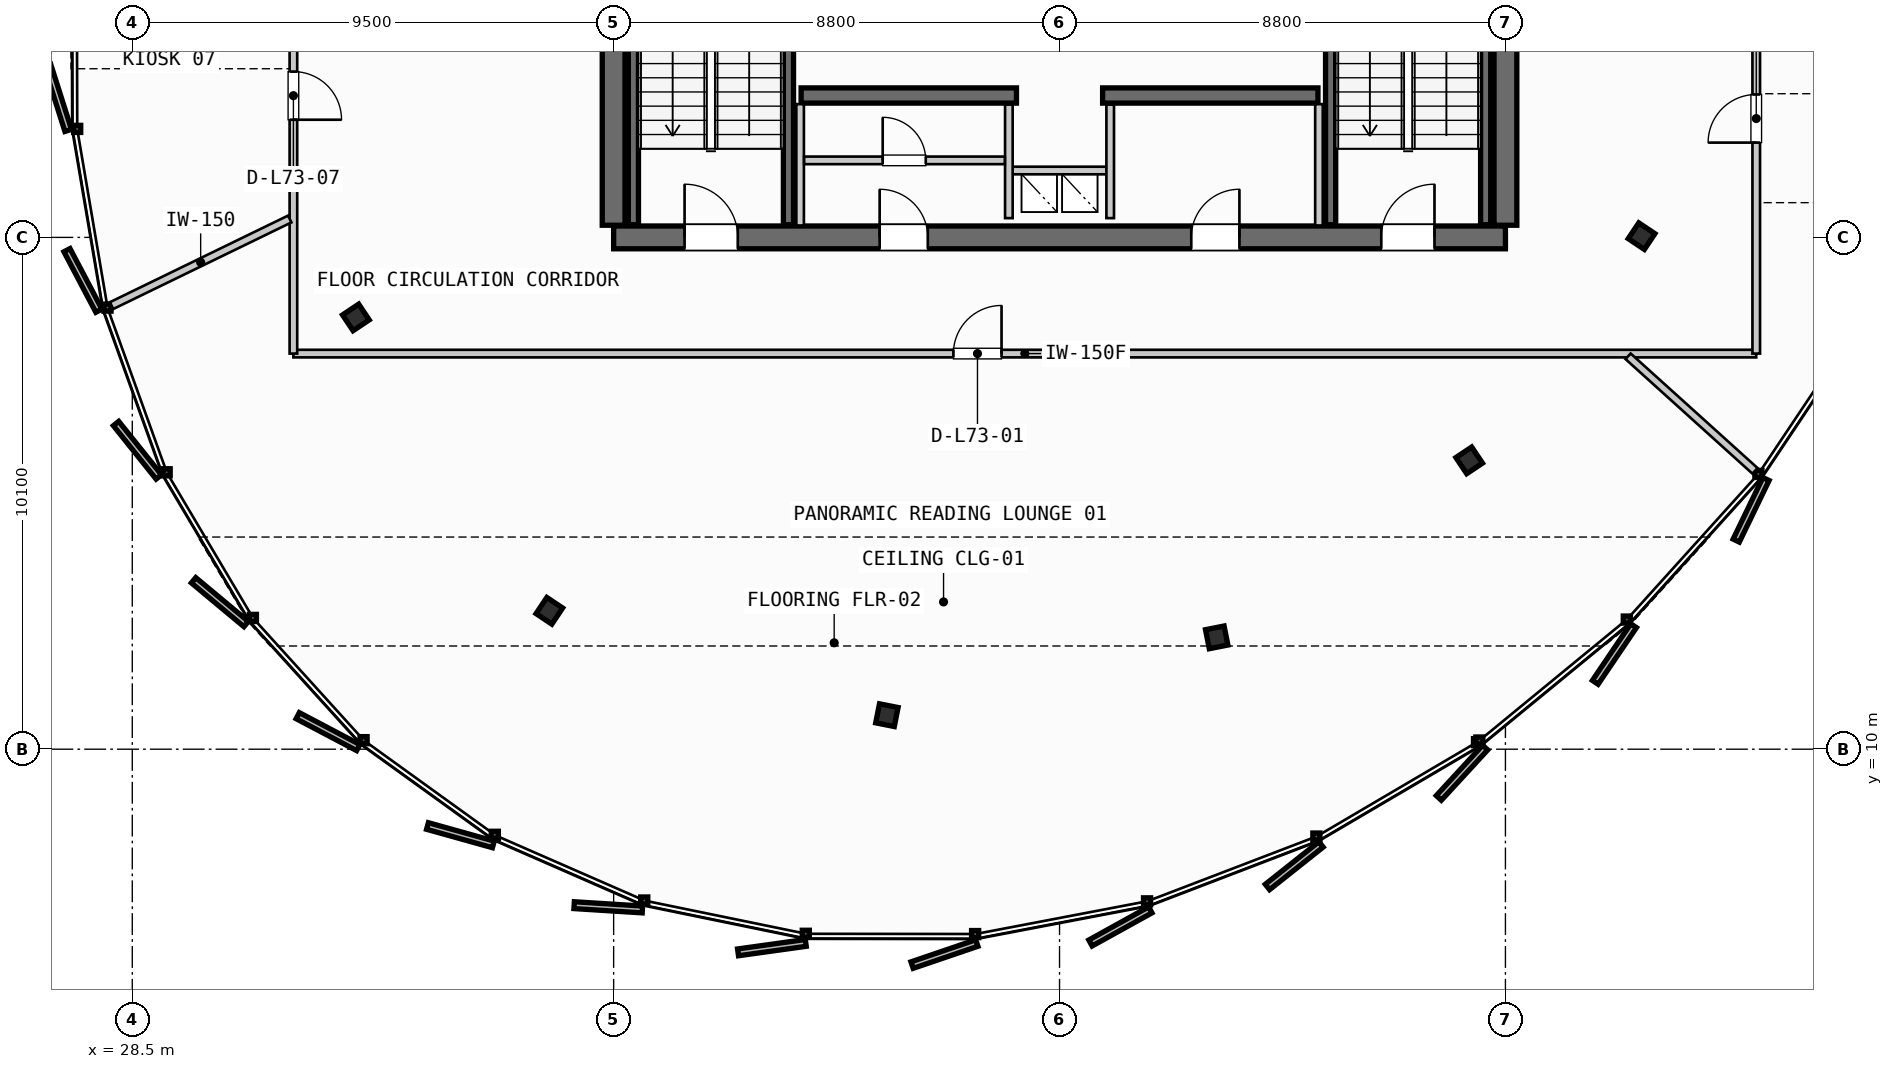
"""IFC4 building model, lengths in metres.
Left out: names, types, materials, properties, quantities, classifications, styles, units other than length and angle.
Written with IfcOpenShell. Run it as: python <this file> out.ifc"""

import sys

from ifc_helpers import new_model, si_unit, direction, frame, frame_2d, origin, origin_2d, place, context, subcontext, project, spatial, rectangle, i_section, extrude, source, transform, mapped, element, fill, save


model = new_model("IFC4")
c1 = context("Model", 3, precision=1e-05, world=origin(), true_north=direction((0.0, 1.0)))
c2 = subcontext(c1, "Body", "Model", "MODEL_VIEW")
j1 = project(units=[si_unit("LENGTHUNIT", "METRE"), si_unit("PLANEANGLEUNIT", "RADIAN")], contexts=[c1])
p1 = place(None, origin())
s1 = spatial("IfcSite", under=j1, at=p1, CompositionType="ELEMENT")
p2 = place(p1, origin())
s2 = spatial("IfcBuilding", under=s1, at=p2, CompositionType="ELEMENT")
p3 = place(p2, frame((0.0, 0.0, 276.7)))
s3 = spatial("IfcBuildingStorey", under=s2, at=p3, CompositionType="ELEMENT", Elevation=276.7)
p4 = place(p3, frame((38.0, 20.1, 0.0), z_axis=(0.0, 0.0, 1.0), x_axis=(1.0, 0.0, 0.0)))
e1 = element("IfcWall", 1, at=p4, inside=s3, PredefinedType="SHEAR", context=c2, shape_type="SweptSolid", body=[
    extrude(rectangle(XDim=17.6, YDim=0.45, at=frame_2d((8.8, 0.0))), origin(), (0.0, 0.0, 1.0), 3.21),
])
p5 = place(p4, frame((1.4, 0.0, 0.0)))
e2 = element("IfcOpeningElement", 2, at=p5, cuts=e1, PredefinedType="OPENING", context=c2, shape_type="SweptSolid", body=[
    extrude(rectangle(XDim=1.05, YDim=2.15, at=frame_2d((0.525, 1.075))), frame((0.0, 0.235, 0.0), z_axis=(0.0, -1.0, 0.0), x_axis=(1.0, 0.0, 0.0)), (0.0, 0.0, 1.0), 0.47),
])
p6 = place(p4, frame((15.15, 0.0, 0.0)))
e3 = element("IfcOpeningElement", 3, at=p6, cuts=e1, PredefinedType="OPENING", context=c2, shape_type="SweptSolid", body=[
    extrude(rectangle(XDim=1.05, YDim=2.15, at=frame_2d((0.525, 1.075))), frame((0.0, 0.235, 0.0), z_axis=(0.0, -1.0, 0.0), x_axis=(1.0, 0.0, 0.0)), (0.0, 0.0, 1.0), 0.47),
])
p7 = place(p4, frame((5.25, 0.0, 0.0)))
e4 = element("IfcOpeningElement", 4, at=p7, cuts=e1, PredefinedType="OPENING", context=c2, shape_type="SweptSolid", body=[
    extrude(rectangle(XDim=0.95, YDim=2.15, at=frame_2d((0.475, 1.075))), frame((0.0, 0.235, 0.0), z_axis=(0.0, -1.0, 0.0), x_axis=(1.0, 0.0, 0.0)), (0.0, 0.0, 1.0), 0.47),
])
p8 = place(p4, frame((11.4, 0.0, 0.0)))
e5 = element("IfcOpeningElement", 5, at=p8, cuts=e1, PredefinedType="OPENING", context=c2, shape_type="SweptSolid", body=[
    extrude(rectangle(XDim=0.95, YDim=2.15, at=frame_2d((0.475, 1.075))), frame((0.0, 0.235, 0.0), z_axis=(0.0, -1.0, 0.0), x_axis=(1.0, 0.0, 0.0)), (0.0, 0.0, 1.0), 0.47),
])
p9 = place(p3, frame((38.0, 35.26, 0.0), z_axis=(0.0, 0.0, 1.0), x_axis=(0.0, -1.0, 0.0)))
e6 = element("IfcWall", 6, at=p9, inside=s3, PredefinedType="SHEAR", context=c2, shape_type="SweptSolid", body=[
    extrude(rectangle(XDim=14.92, YDim=0.45, at=frame_2d((7.46, 0.0))), origin(), (0.0, 0.0, 1.0), 3.21),
])
p10 = place(p9, frame((5.21, 0.0, 0.0)))
e7 = element("IfcOpeningElement", 7, at=p10, cuts=e6, PredefinedType="OPENING", context=c2, shape_type="SweptSolid", body=[
    extrude(rectangle(XDim=1.1, YDim=2.2, at=frame_2d((0.55, 1.1))), frame((0.0, 0.235, 0.0), z_axis=(0.0, -1.0, 0.0), x_axis=(1.0, 0.0, 0.0)), (0.0, 0.0, 1.0), 0.47),
])
p11 = place(p3, frame((55.6, 20.34, 0.0), z_axis=(0.0, 0.0, 1.0), x_axis=(0.0, 1.0, 0.0)))
e8 = element("IfcWall", 8, at=p11, inside=s3, PredefinedType="SHEAR", context=c2, shape_type="SweptSolid", body=[
    extrude(rectangle(XDim=14.92, YDim=0.45, at=frame_2d((7.46, 0.0))), origin(), (0.0, 0.0, 1.0), 3.21),
])
p12 = place(p11, frame((12.71, 0.0, 0.0)))
e9 = element("IfcOpeningElement", 9, at=p12, cuts=e8, PredefinedType="OPENING", context=c2, shape_type="SweptSolid", body=[
    extrude(rectangle(XDim=1.05, YDim=2.15, at=frame_2d((0.525, 1.075))), frame((0.0, 0.235, 0.0), z_axis=(0.0, -1.0, 0.0), x_axis=(1.0, 0.0, 0.0)), (0.0, 0.0, 1.0), 0.47),
])
p13 = place(p11, frame((8.61, 0.0, 0.0)))
e10 = element("IfcOpeningElement", 10, at=p13, cuts=e8, PredefinedType="OPENING", context=c2, shape_type="SweptSolid", body=[
    extrude(rectangle(XDim=1.1, YDim=2.2, at=frame_2d((0.55, 1.1))), frame((0.0, 0.235, 0.0), z_axis=(0.0, -1.0, 0.0), x_axis=(1.0, 0.0, 0.0)), (0.0, 0.0, 1.0), 0.47),
])
for number, where, z_axis, x_axis in (
    (11, (41.7, 22.9, 0.0), (0.0, 0.0, 1.0), (1.0, 0.0, 0.0)),
    (12, (47.65, 22.9, 0.0), (0.0, 0.0, 1.0), (1.0, 0.0, 0.0)),
):
    element("IfcWall", number, at=place(p3, frame(where, z_axis=z_axis, x_axis=x_axis)), inside=s3, PredefinedType="SHEAR", context=c2, shape_type="SweptSolid", body=[
        extrude(rectangle(XDim=4.25, YDim=0.3, at=frame_2d((2.125, 0.0))), origin(), (0.0, 0.0, 1.0), 3.21),
    ])
m1 = source(origin(), c2, "Body", "SweptSolid", [
    extrude(i_section(OverallWidth=0.374, OverallDepth=0.383, WebThickness=0.017, FlangeThickness=0.026, FilletRadius=0.015, at=origin_2d()), origin(), (0.0, 0.0, 1.0), 3.21),
])
for number, where, z_axis, x_axis in (
    (13, (32.913, 18.521, 0.0), (0.0, 0.0, 1.0), (-0.831, -0.556, 0.0)),
    (14, (36.731, 12.731, 0.0), (0.0, 0.0, 1.0), (-0.556, -0.831, 0.0)),
    (15, (43.393, 10.671, 0.0), (0.0, 0.0, 1.0), (-0.195, -0.981, 0.0)),
    (16, (49.902, 12.207, 0.0), (0.0, 0.0, 1.0), (0.195, -0.981, 0.0)),
    (17, (54.885, 15.7, 0.0), (0.0, 0.0, 1.0), (0.556, -0.831, 0.0)),
    (18, (58.287, 20.125, 0.0), (0.0, 0.0, 1.0), (0.831, -0.556, 0.0)),
):
    element("IfcColumn", number, at=place(p3, frame(where, z_axis=z_axis, x_axis=x_axis)), inside=s3, PredefinedType="COLUMN", context=c2, shape_type="MappedRepresentation", body=[
        mapped(m1, transform((0.0, 0.0, 0.0), scale=1.0)),
    ])
for number, where, z_axis, x_axis in (
    (19, (41.45, 27.7, 0.0), (0.0, 0.0, 1.0), (0.0, -1.0, 0.0)),
    (20, (38.39, 20.35, 0.0), (0.0, 0.0, 1.0), (0.0, 1.0, 0.0)),
    (21, (55.21, 27.7, 0.0), (0.0, 0.0, 1.0), (0.0, -1.0, 0.0)),
    (22, (52.15, 20.35, 0.0), (0.0, 0.0, 1.0), (0.0, 1.0, 0.0)),
):
    element("IfcWall", number, at=place(p3, frame(where, z_axis=z_axis, x_axis=x_axis)), inside=s3, PredefinedType="SHEAR", context=c2, shape_type="SweptSolid", body=[
        extrude(rectangle(XDim=7.35, YDim=0.2, at=frame_2d((3.675, 0.0))), origin(), (0.0, 0.0, 1.0), 3.21),
    ])
p14 = place(p3, frame((45.8, 21.42, 0.0), z_axis=(0.0, 0.0, 1.0), x_axis=(1.0, 0.0, 0.0)))
e23 = element("IfcWall", 23, at=p14, inside=s3, PredefinedType="PARTITIONING", context=c2, shape_type="SweptSolid", body=[
    extrude(rectangle(XDim=2.0, YDim=0.15, at=frame_2d((1.0, 0.0))), origin(), (0.0, 0.0, 1.0), 2.455),
])
for number, where, z_axis, x_axis in (
    (24, (45.8, 20.48, 0.0), (0.0, 0.0, 1.0), (0.0, 1.0, 0.0)),
    (25, (47.8, 20.48, 0.0), (0.0, 0.0, 1.0), (0.0, 1.0, 0.0)),
):
    element("IfcWall", number, at=place(p3, frame(where, z_axis=z_axis, x_axis=x_axis)), inside=s3, PredefinedType="PARTITIONING", context=c2, shape_type="SweptSolid", body=[
        extrude(rectangle(XDim=2.24, YDim=0.15, at=frame_2d((1.12, 0.0))), origin(), (0.0, 0.0, 1.0), 2.455),
    ])
for number, where, z_axis, x_axis in (
    (26, (41.68, 20.335, 0.0), (0.0, 0.0, 1.0), (0.0, 1.0, 0.0)),
    (27, (51.92, 20.335, 0.0), (0.0, 0.0, 1.0), (0.0, 1.0, 0.0)),
):
    element("IfcWall", number, at=place(p3, frame(where, z_axis=z_axis, x_axis=x_axis)), inside=s3, PredefinedType="PARTITIONING", context=c2, shape_type="SweptSolid", body=[
        extrude(rectangle(XDim=2.395, YDim=0.15, at=frame_2d((1.198, 0.0))), origin(), (0.0, 0.0, 1.0), 2.455),
    ])
p15 = place(p3, frame((41.76, 21.62, 0.0), z_axis=(0.0, 0.0, 1.0), x_axis=(1.0, 0.0, 0.0)))
e28 = element("IfcWall", 28, at=p15, inside=s3, PredefinedType="PARTITIONING", context=c2, shape_type="SweptSolid", body=[
    extrude(rectangle(XDim=3.96, YDim=0.15, at=frame_2d((1.98, 0.0))), origin(), (0.0, 0.0, 1.0), 2.455),
])
p16 = place(p15, frame((1.55, 0.0, 0.0)))
e29 = element("IfcOpeningElement", 29, at=p16, cuts=e28, PredefinedType="OPENING", context=c2, shape_type="SweptSolid", body=[
    extrude(rectangle(XDim=0.85, YDim=2.15, at=frame_2d((0.425, 1.075))), frame((0.0, 0.085, 0.0), z_axis=(0.0, -1.0, 0.0), x_axis=(1.0, 0.0, 0.0)), (0.0, 0.0, 1.0), 0.17),
])
p17 = place(p3, frame((31.68, 17.807, 0.0), z_axis=(0.0, 0.0, 1.0), x_axis=(1.0, 0.0, 0.0)))
e30 = element("IfcWall", 30, at=p17, inside=s3, PredefinedType="PARTITIONING", context=c2, shape_type="SweptSolid", body=[
    extrude(rectangle(XDim=28.87, YDim=0.15, at=frame_2d((14.435, 0.0))), origin(), (0.0, 0.0, 1.0), 2.455),
])
p18 = place(p17, frame((13.025, 0.0, 0.0)))
e31 = element("IfcOpeningElement", 31, at=p18, cuts=e30, PredefinedType="OPENING", context=c2, shape_type="SweptSolid", body=[
    extrude(rectangle(XDim=0.95, YDim=2.15, at=frame_2d((0.475, 1.075))), frame((0.0, 0.085, 0.0), z_axis=(0.0, -1.0, 0.0), x_axis=(1.0, 0.0, 0.0)), (0.0, 0.0, 1.0), 0.17),
])
p19 = place(p3, frame((60.55, 17.807, 0.0), z_axis=(0.0, 0.0, 1.0), x_axis=(0.0, 1.0, 0.0)))
e32 = element("IfcWall", 32, at=p19, inside=s3, PredefinedType="PARTITIONING", context=c2, shape_type="SweptSolid", body=[
    extrude(rectangle(XDim=19.986, YDim=0.15, at=frame_2d((9.993, 0.0))), origin(), (0.0, 0.0, 1.0), 2.455),
])
p20 = place(p19, frame((4.164, 0.0, 0.0)))
e33 = element("IfcOpeningElement", 33, at=p20, cuts=e32, PredefinedType="OPENING", context=c2, shape_type="SweptSolid", body=[
    extrude(rectangle(XDim=0.95, YDim=2.15, at=frame_2d((0.475, 1.075))), frame((0.0, 0.085, 0.0), z_axis=(0.0, -1.0, 0.0), x_axis=(1.0, 0.0, 0.0)), (0.0, 0.0, 1.0), 0.17),
])
p21 = place(p19, frame((14.036, 0.0, 0.0)))
e34 = element("IfcOpeningElement", 34, at=p21, cuts=e32, PredefinedType="OPENING", context=c2, shape_type="SweptSolid", body=[
    extrude(rectangle(XDim=0.95, YDim=2.15, at=frame_2d((0.475, 1.075))), frame((0.0, 0.085, 0.0), z_axis=(0.0, -1.0, 0.0), x_axis=(1.0, 0.0, 0.0)), (0.0, 0.0, 1.0), 0.17),
])
p22 = place(p3, frame((31.68, 37.793, 0.0), z_axis=(0.0, 0.0, 1.0), x_axis=(0.0, -1.0, 0.0)))
e35 = element("IfcWall", 35, at=p22, inside=s3, PredefinedType="PARTITIONING", context=c2, shape_type="SweptSolid", body=[
    extrude(rectangle(XDim=19.986, YDim=0.15, at=frame_2d((9.993, 0.0))), origin(), (0.0, 0.0, 1.0), 2.455),
])
p23 = place(p22, frame((4.422, 0.0, 0.0)))
e36 = element("IfcOpeningElement", 36, at=p23, cuts=e35, PredefinedType="OPENING", context=c2, shape_type="SweptSolid", body=[
    extrude(rectangle(XDim=0.95, YDim=2.15, at=frame_2d((0.475, 1.075))), frame((0.0, 0.085, 0.0), z_axis=(0.0, -1.0, 0.0), x_axis=(1.0, 0.0, 0.0)), (0.0, 0.0, 1.0), 0.17),
])
p24 = place(p22, frame((14.421, 0.0, 0.0)))
e37 = element("IfcOpeningElement", 37, at=p24, cuts=e35, PredefinedType="OPENING", context=c2, shape_type="SweptSolid", body=[
    extrude(rectangle(XDim=0.95, YDim=2.15, at=frame_2d((0.475, 1.075))), frame((0.0, 0.085, 0.0), z_axis=(0.0, -1.0, 0.0), x_axis=(1.0, 0.0, 0.0)), (0.0, 0.0, 1.0), 0.17),
])
p25 = place(p3, frame((31.608, 20.463, 0.0), z_axis=(0.0, 0.0, 1.0), x_axis=(-0.899391040277, -0.437145006455, 0.0)))
e38 = element("IfcWall", 38, at=p25, inside=s3, PredefinedType="PARTITIONING", context=c2, shape_type="SweptSolid", body=[
    extrude(rectangle(XDim=3.91, YDim=0.15, at=frame_2d((1.955, 0.0))), origin(), (0.0, 0.0, 1.0), 2.455),
])
p26 = place(p3, frame((58.021, 17.753, 0.0), z_axis=(0.0, 0.0, 1.0), x_axis=(0.742383464778, -0.669975216873, 0.0)))
e39 = element("IfcWall", 39, at=p26, inside=s3, PredefinedType="PARTITIONING", context=c2, shape_type="SweptSolid", body=[
    extrude(rectangle(XDim=3.375, YDim=0.15, at=frame_2d((1.688, 0.0))), origin(), (0.0, 0.0, 1.0), 2.455),
])
m2 = source(origin(), c2, "Body", "SweptSolid", [
    extrude(rectangle(XDim=1.05, YDim=2.15, at=frame_2d((0.525, 1.075))), frame((0.0, 0.025, 0.0), z_axis=(0.0, -1.0, 0.0), x_axis=(1.0, 0.0, 0.0)), (0.0, 0.0, 1.0), 0.05),
])
p27 = place(p5, origin())
e40 = element("IfcDoor", 40, at=p27, inside=s3, OperationType="SINGLE_SWING_LEFT", PredefinedType="DOOR", context=c2, shape_type="MappedRepresentation", body=[
    mapped(m2, transform((0.0, 0.0, 0.0), scale=1.0)),
])
fill(e2, e40)
p28 = place(p6, origin())
e41 = element("IfcDoor", 41, at=p28, inside=s3, OperationType="SINGLE_SWING_RIGHT", PredefinedType="DOOR", context=c2, shape_type="MappedRepresentation", body=[
    mapped(m2, transform((0.0, 0.0, 0.0), scale=1.0)),
])
fill(e3, e41)
m3 = source(origin(), c2, "Body", "SweptSolid", [
    extrude(rectangle(XDim=0.95, YDim=2.15, at=frame_2d((0.475, 1.075))), frame((0.0, 0.025, 0.0), z_axis=(0.0, -1.0, 0.0), x_axis=(1.0, 0.0, 0.0)), (0.0, 0.0, 1.0), 0.05),
])
p29 = place(p7, origin())
e42 = element("IfcDoor", 42, at=p29, inside=s3, OperationType="SINGLE_SWING_LEFT", PredefinedType="DOOR", context=c2, shape_type="MappedRepresentation", body=[
    mapped(m3, transform((0.0, 0.0, 0.0), scale=1.0)),
])
fill(e4, e42)
p30 = place(p8, origin())
e43 = element("IfcDoor", 43, at=p30, inside=s3, OperationType="SINGLE_SWING_RIGHT", PredefinedType="DOOR", context=c2, shape_type="MappedRepresentation", body=[
    mapped(m3, transform((0.0, 0.0, 0.0), scale=1.0)),
])
fill(e5, e43)
m4 = source(origin(), c2, "Body", "SweptSolid", [
    extrude(rectangle(XDim=0.85, YDim=2.15, at=frame_2d((0.425, 1.075))), frame((0.0, 0.025, 0.0), z_axis=(0.0, -1.0, 0.0), x_axis=(1.0, 0.0, 0.0)), (0.0, 0.0, 1.0), 0.05),
])
p31 = place(p16, origin())
e44 = element("IfcDoor", 44, at=p31, inside=s3, OperationType="SINGLE_SWING_LEFT", PredefinedType="DOOR", context=c2, shape_type="MappedRepresentation", body=[
    mapped(m4, transform((0.0, 0.0, 0.0), scale=1.0)),
])
fill(e29, e44)
p32 = place(p18, origin())
e45 = element("IfcDoor", 45, at=p32, inside=s3, OperationType="SINGLE_SWING_RIGHT", PredefinedType="DOOR", context=c2, shape_type="MappedRepresentation", body=[
    mapped(m3, transform((0.0, 0.0, 0.0), scale=1.0)),
])
fill(e31, e45)
p33 = place(p20, origin())
e46 = element("IfcDoor", 46, at=p33, inside=s3, OperationType="SINGLE_SWING_LEFT", PredefinedType="DOOR", context=c2, shape_type="MappedRepresentation", body=[
    mapped(m3, transform((0.0, 0.0, 0.0), scale=1.0)),
])
fill(e33, e46)
p34 = place(p24, origin())
e47 = element("IfcDoor", 47, at=p34, inside=s3, OperationType="SINGLE_SWING_RIGHT", PredefinedType="DOOR", context=c2, shape_type="MappedRepresentation", body=[
    mapped(m3, transform((0.0, 0.0, 0.0), scale=1.0)),
])
fill(e37, e47)
save(model, sys.argv[1])
